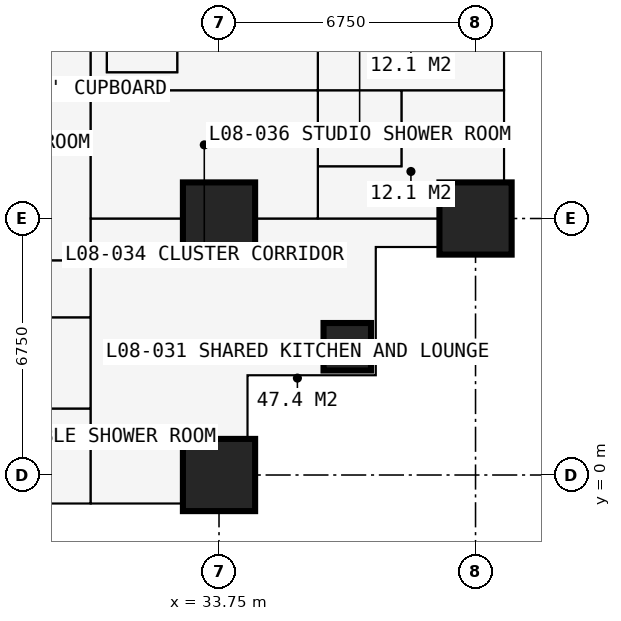
"""IFC4 building model, lengths in metres.
Left out: names, types, materials, properties, quantities, classifications, styles, units other than length and angle.
Written with IfcOpenShell. Run it as: python <this file> out.ifc"""

import sys

from ifc_helpers import new_model, si_unit, direction, frame, frame_2d, origin, origin_2d, place, context, subcontext, project, spatial, rectangle, extrude, element, fill, save


model = new_model("IFC4")
c1 = context("Model", 3, precision=1e-05, world=origin(), true_north=direction((0.0, 1.0)))
c2 = subcontext(c1, "Body", "Model", "MODEL_VIEW")
j1 = project(units=[si_unit("LENGTHUNIT", "METRE"), si_unit("PLANEANGLEUNIT", "RADIAN")], contexts=[c1])
p1 = place(None, origin())
s1 = spatial("IfcSite", under=j1, at=p1, CompositionType="ELEMENT")
p2 = place(p1, origin())
s2 = spatial("IfcBuilding", under=s1, at=p2, CompositionType="ELEMENT")
p3 = place(p2, frame((0.0, 0.0, 32.4)))
s3 = spatial("IfcBuildingStorey", under=s2, at=p3, CompositionType="ELEMENT", Elevation=32.4)
for number, where, z_axis, x_axis in (
    (1, (33.75, 0.0, 0.0), (0.0, 0.0, 1.0), (1.0, 0.0, 0.0)),
    (2, (33.75, 6.75, 0.0), (0.0, 0.0, 1.0), (1.0, 0.0, 0.0)),
):
    element("IfcColumn", number, at=place(p3, frame(where, z_axis=z_axis, x_axis=x_axis)), inside=s3, PredefinedType="COLUMN", context=c2, shape_type="SweptSolid", body=[
        extrude(rectangle(XDim=1.9, YDim=1.9, at=origin_2d()), origin(), (0.0, 0.0, 1.0), 3.6),
    ])
p4 = place(p3, frame((37.125, 3.375, 0.0), z_axis=(0.0, 0.0, 1.0), x_axis=(1.0, 0.0, 0.0)))
e3 = element("IfcColumn", 3, at=p4, inside=s3, PredefinedType="COLUMN", context=c2, shape_type="SweptSolid", body=[
    extrude(rectangle(XDim=1.25, YDim=1.25, at=origin_2d()), origin(), (0.0, 0.0, 1.0), 3.6),
])
p5 = place(p3, frame((40.5, 6.75, 0.0), z_axis=(0.0, 0.0, 1.0), x_axis=(1.0, 0.0, 0.0)))
e4 = element("IfcColumn", 4, at=p5, inside=s3, PredefinedType="COLUMN", context=c2, shape_type="SweptSolid", body=[
    extrude(rectangle(XDim=1.9, YDim=1.9, at=origin_2d()), origin(), (0.0, 0.0, 1.0), 3.6),
])
p6 = place(p3, frame((34.5, -0.75, 0.0), z_axis=(0.0, 0.0, 1.0), x_axis=(0.0, 1.0, 0.0)))
e5 = element("IfcWall", 5, at=p6, inside=s3, PredefinedType="SOLIDWALL", context=c2, shape_type="SweptSolid", body=[
    extrude(rectangle(XDim=3.375, YDim=0.3, at=frame_2d((1.688, 0.0))), origin(), (0.0, 0.0, 1.0), 3.375),
])
p7 = place(p6, frame((1.857, 0.0, 0.9)))
e6 = element("IfcOpeningElement", 6, at=p7, cuts=e5, PredefinedType="OPENING", context=c2, shape_type="SweptSolid", body=[
    extrude(rectangle(XDim=1.2, YDim=1.8, at=frame_2d((0.6, 0.9))), frame((0.0, 0.16, 0.0), z_axis=(0.0, -1.0, 0.0), x_axis=(1.0, 0.0, 0.0)), (0.0, 0.0, 1.0), 0.32),
])
p8 = place(p3, frame((34.5, 2.625, 0.0), z_axis=(0.0, 0.0, 1.0), x_axis=(1.0, 0.0, 0.0)))
e7 = element("IfcWall", 7, at=p8, inside=s3, PredefinedType="SOLIDWALL", context=c2, shape_type="SweptSolid", body=[
    extrude(rectangle(XDim=3.375, YDim=0.3, at=frame_2d((1.688, 0.0))), origin(), (0.0, 0.0, 1.0), 3.375),
])
p9 = place(p8, frame((0.788, 0.0, 0.6)))
e8 = element("IfcOpeningElement", 8, at=p9, cuts=e7, PredefinedType="OPENING", context=c2, shape_type="SweptSolid", body=[
    extrude(rectangle(XDim=1.8, YDim=2.1, at=frame_2d((0.9, 1.05))), frame((0.0, 0.16, 0.0), z_axis=(0.0, -1.0, 0.0), x_axis=(1.0, 0.0, 0.0)), (0.0, 0.0, 1.0), 0.32),
])
p10 = place(p3, frame((37.875, 2.625, 0.0), z_axis=(0.0, 0.0, 1.0), x_axis=(0.0, 1.0, 0.0)))
e9 = element("IfcWall", 9, at=p10, inside=s3, PredefinedType="SOLIDWALL", context=c2, shape_type="SweptSolid", body=[
    extrude(rectangle(XDim=3.375, YDim=0.3, at=frame_2d((1.688, 0.0))), origin(), (0.0, 0.0, 1.0), 3.375),
])
p11 = place(p10, frame((0.788, 0.0, 0.6)))
e10 = element("IfcOpeningElement", 10, at=p11, cuts=e9, PredefinedType="OPENING", context=c2, shape_type="SweptSolid", body=[
    extrude(rectangle(XDim=1.8, YDim=2.1, at=frame_2d((0.9, 1.05))), frame((0.0, 0.16, 0.0), z_axis=(0.0, -1.0, 0.0), x_axis=(1.0, 0.0, 0.0)), (0.0, 0.0, 1.0), 0.32),
])
p12 = place(p3, frame((37.875, 6.0, 0.0), z_axis=(0.0, 0.0, 1.0), x_axis=(1.0, 0.0, 0.0)))
e11 = element("IfcWall", 11, at=p12, inside=s3, PredefinedType="SOLIDWALL", context=c2, shape_type="SweptSolid", body=[
    extrude(rectangle(XDim=3.375, YDim=0.3, at=frame_2d((1.688, 0.0))), origin(), (0.0, 0.0, 1.0), 3.375),
])
p13 = place(p12, frame((0.317, 0.0, 0.9)))
e12 = element("IfcOpeningElement", 12, at=p13, cuts=e11, PredefinedType="OPENING", context=c2, shape_type="SweptSolid", body=[
    extrude(rectangle(XDim=1.2, YDim=1.8, at=frame_2d((0.6, 0.9))), frame((0.0, 0.16, 0.0), z_axis=(0.0, -1.0, 0.0), x_axis=(1.0, 0.0, 0.0)), (0.0, 0.0, 1.0), 0.32),
])
p14 = place(p3, frame((6.75, 4.15, 0.0), z_axis=(0.0, 0.0, 1.0), x_axis=(1.0, 0.0, 0.0)))
e13 = element("IfcWall", 13, at=p14, inside=s3, PredefinedType="PARTITIONING", context=c2, shape_type="SweptSolid", body=[
    extrude(rectangle(XDim=23.625, YDim=0.1, at=frame_2d((11.812, 0.0))), origin(), (0.0, 0.0, 1.0), 3.375),
])
p15 = place(p14, frame((2.85, 0.0, 0.0)))
e14 = element("IfcOpeningElement", 14, at=p15, cuts=e13, PredefinedType="OPENING", context=c2, shape_type="SweptSolid", body=[
    extrude(rectangle(XDim=1.0, YDim=2.2, at=frame_2d((0.5, 1.1))), frame((0.0, 0.06, 0.0), z_axis=(0.0, -1.0, 0.0), x_axis=(1.0, 0.0, 0.0)), (0.0, 0.0, 1.0), 0.12),
])
p16 = place(p14, frame((6.95, 0.0, 0.0)))
e15 = element("IfcOpeningElement", 15, at=p16, cuts=e13, PredefinedType="OPENING", context=c2, shape_type="SweptSolid", body=[
    extrude(rectangle(XDim=0.95, YDim=2.2, at=frame_2d((0.475, 1.1))), frame((0.0, 0.06, 0.0), z_axis=(0.0, -1.0, 0.0), x_axis=(1.0, 0.0, 0.0)), (0.0, 0.0, 1.0), 0.12),
])
p17 = place(p14, frame((10.375, 0.0, 0.0)))
e16 = element("IfcOpeningElement", 16, at=p17, cuts=e13, PredefinedType="OPENING", context=c2, shape_type="SweptSolid", body=[
    extrude(rectangle(XDim=0.95, YDim=2.2, at=frame_2d((0.475, 1.1))), frame((0.0, 0.06, 0.0), z_axis=(0.0, -1.0, 0.0), x_axis=(1.0, 0.0, 0.0)), (0.0, 0.0, 1.0), 0.12),
])
p18 = place(p14, frame((18.475, 0.0, 0.0)))
e17 = element("IfcOpeningElement", 17, at=p18, cuts=e13, PredefinedType="OPENING", context=c2, shape_type="SweptSolid", body=[
    extrude(rectangle(XDim=0.95, YDim=2.2, at=frame_2d((0.475, 1.1))), frame((0.0, 0.06, 0.0), z_axis=(0.0, -1.0, 0.0), x_axis=(1.0, 0.0, 0.0)), (0.0, 0.0, 1.0), 0.12),
])
p19 = place(p14, frame((13.7, 0.0, 0.0)))
e18 = element("IfcOpeningElement", 18, at=p19, cuts=e13, PredefinedType="OPENING", context=c2, shape_type="SweptSolid", body=[
    extrude(rectangle(XDim=0.95, YDim=2.2, at=frame_2d((0.475, 1.1))), frame((0.0, 0.06, 0.0), z_axis=(0.0, -1.0, 0.0), x_axis=(1.0, 0.0, 0.0)), (0.0, 0.0, 1.0), 0.12),
])
p20 = place(p3, frame((22.988, 5.65, 0.0), z_axis=(0.0, 0.0, 1.0), x_axis=(1.0, 0.0, 0.0)))
e19 = element("IfcWall", 19, at=p20, inside=s3, PredefinedType="PARTITIONING", context=c2, shape_type="SweptSolid", body=[
    extrude(rectangle(XDim=7.387, YDim=0.15, at=frame_2d((3.694, 0.0))), origin(), (0.0, 0.0, 1.0), 3.375),
])
p21 = place(p20, frame((2.1, 0.0, 0.0)))
e20 = element("IfcOpeningElement", 20, at=p21, cuts=e19, PredefinedType="OPENING", context=c2, shape_type="SweptSolid", body=[
    extrude(rectangle(XDim=0.95, YDim=2.2, at=frame_2d((0.475, 1.1))), frame((0.0, 0.085, 0.0), z_axis=(0.0, -1.0, 0.0), x_axis=(1.0, 0.0, 0.0)), (0.0, 0.0, 1.0), 0.17),
])
p22 = place(p3, frame((27.775, 1.75, 0.0), z_axis=(0.0, 0.0, 1.0), x_axis=(1.0, 0.0, 0.0)))
e21 = element("IfcWall", 21, at=p22, inside=s3, PredefinedType="PARTITIONING", context=c2, shape_type="SweptSolid", body=[
    extrude(rectangle(XDim=2.6, YDim=0.1, at=frame_2d((1.3, 0.0))), origin(), (0.0, 0.0, 1.0), 3.375),
])
p23 = place(p22, frame((0.85, 0.0, 0.0)))
e22 = element("IfcOpeningElement", 22, at=p23, cuts=e21, PredefinedType="OPENING", context=c2, shape_type="SweptSolid", body=[
    extrude(rectangle(XDim=0.9, YDim=2.2, at=frame_2d((0.45, 1.1))), frame((0.0, 0.06, 0.0), z_axis=(0.0, -1.0, 0.0), x_axis=(1.0, 0.0, 0.0)), (0.0, 0.0, 1.0), 0.12),
])
p24 = place(p3, frame((30.375, -0.734, 0.0), z_axis=(0.0, 0.0, 1.0), x_axis=(0.0, 1.0, 0.0)))
e23 = element("IfcWall", 23, at=p24, inside=s3, PredefinedType="PARTITIONING", context=c2, shape_type="SweptSolid", body=[
    extrude(rectangle(XDim=12.034, YDim=0.15, at=frame_2d((6.017, 0.0))), origin(), (0.0, 0.0, 1.0), 3.375),
])
p25 = place(p3, frame((30.375, 6.75, 0.0), z_axis=(0.0, 0.0, 1.0), x_axis=(1.0, 0.0, 0.0)))
e24 = element("IfcWall", 24, at=p25, inside=s3, PredefinedType="PARTITIONING", context=c2, shape_type="SweptSolid", body=[
    extrude(rectangle(XDim=10.859, YDim=0.15, at=frame_2d((5.429, 0.0))), origin(), (0.0, 0.0, 1.0), 2.877),
])
p26 = place(p25, frame((1.4, 0.0, 0.0)))
e25 = element("IfcOpeningElement", 25, at=p26, cuts=e24, PredefinedType="OPENING", context=c2, shape_type="SweptSolid", body=[
    extrude(rectangle(XDim=1.0, YDim=2.2, at=frame_2d((0.5, 1.1))), frame((0.0, 0.085, 0.0), z_axis=(0.0, -1.0, 0.0), x_axis=(1.0, 0.0, 0.0)), (0.0, 0.0, 1.0), 0.17),
])
p27 = place(p3, frame((30.375, 10.125, 0.0), z_axis=(0.0, 0.0, 1.0), x_axis=(1.0, 0.0, 0.0)))
e26 = element("IfcWall", 26, at=p27, inside=s3, PredefinedType="PARTITIONING", context=c2, shape_type="SweptSolid", body=[
    extrude(rectangle(XDim=10.859, YDim=0.15, at=frame_2d((5.429, 0.0))), origin(), (0.0, 0.0, 1.0), 3.375),
])
p28 = place(p27, frame((2.5, 0.0, 0.0)))
e27 = element("IfcOpeningElement", 27, at=p28, cuts=e26, PredefinedType="OPENING", context=c2, shape_type="SweptSolid", body=[
    extrude(rectangle(XDim=1.0, YDim=2.2, at=frame_2d((0.5, 1.1))), frame((0.0, 0.085, 0.0), z_axis=(0.0, -1.0, 0.0), x_axis=(1.0, 0.0, 0.0)), (0.0, 0.0, 1.0), 0.17),
])
p29 = place(p3, frame((30.8, 10.6, 0.0), z_axis=(0.0, 0.0, 1.0), x_axis=(0.0, 1.0, 0.0)))
e28 = element("IfcWall", 28, at=p29, inside=s3, PredefinedType="PARTITIONING", context=c2, shape_type="SweptSolid", body=[
    extrude(rectangle(XDim=0.7, YDim=0.15, at=frame_2d((0.35, 0.0))), origin(), (0.0, 0.0, 1.0), 3.375),
])
p30 = place(p3, frame((30.8, 10.6, 0.0), z_axis=(0.0, 0.0, 1.0), x_axis=(1.0, 0.0, 0.0)))
e29 = element("IfcWall", 29, at=p30, inside=s3, PredefinedType="PARTITIONING", context=c2, shape_type="SweptSolid", body=[
    extrude(rectangle(XDim=1.85, YDim=0.15, at=frame_2d((0.925, 0.0))), origin(), (0.0, 0.0, 1.0), 3.375),
])
p31 = place(p3, frame((32.65, 10.6, 0.0), z_axis=(0.0, 0.0, 1.0), x_axis=(0.0, 1.0, 0.0)))
e30 = element("IfcWall", 30, at=p31, inside=s3, PredefinedType="SHEAR", context=c2, shape_type="SweptSolid", body=[
    extrude(rectangle(XDim=9.3, YDim=0.1, at=frame_2d((4.65, 0.0))), origin(), (0.0, 0.0, 1.0), 3.375),
])
p32 = place(p31, frame((0.5, 0.0, 0.0)))
e31 = element("IfcOpeningElement", 31, at=p32, cuts=e30, PredefinedType="OPENING", context=c2, shape_type="SweptSolid", body=[
    extrude(rectangle(XDim=1.0, YDim=2.2, at=frame_2d((0.5, 1.1))), frame((0.0, 0.06, 0.0), z_axis=(0.0, -1.0, 0.0), x_axis=(1.0, 0.0, 0.0)), (0.0, 0.0, 1.0), 0.12),
])
p33 = place(p3, frame((36.35, 6.75, 0.0), z_axis=(0.0, 0.0, 1.0), x_axis=(0.0, 1.0, 0.0)))
e32 = element("IfcWall", 32, at=p33, inside=s3, PredefinedType="PARTITIONING", context=c2, shape_type="SweptSolid", body=[
    extrude(rectangle(XDim=23.625, YDim=0.1, at=frame_2d((11.812, 0.0))), origin(), (0.0, 0.0, 1.0), 3.375),
])
p34 = place(p33, frame((0.2, 0.0, 0.0)))
e33 = element("IfcOpeningElement", 33, at=p34, cuts=e32, PredefinedType="OPENING", context=c2, shape_type="SweptSolid", body=[
    extrude(rectangle(XDim=0.95, YDim=2.2, at=frame_2d((0.475, 1.1))), frame((0.0, 0.06, 0.0), z_axis=(0.0, -1.0, 0.0), x_axis=(1.0, 0.0, 0.0)), (0.0, 0.0, 1.0), 0.12),
])
p35 = place(p33, frame((3.575, 0.0, 0.0)))
e34 = element("IfcOpeningElement", 34, at=p35, cuts=e32, PredefinedType="OPENING", context=c2, shape_type="SweptSolid", body=[
    extrude(rectangle(XDim=0.95, YDim=2.2, at=frame_2d((0.475, 1.1))), frame((0.0, 0.06, 0.0), z_axis=(0.0, -1.0, 0.0), x_axis=(1.0, 0.0, 0.0)), (0.0, 0.0, 1.0), 0.12),
])
p36 = place(p33, frame((7.0, 0.0, 0.0)))
e35 = element("IfcOpeningElement", 35, at=p36, cuts=e32, PredefinedType="OPENING", context=c2, shape_type="SweptSolid", body=[
    extrude(rectangle(XDim=0.95, YDim=2.2, at=frame_2d((0.475, 1.1))), frame((0.0, 0.06, 0.0), z_axis=(0.0, -1.0, 0.0), x_axis=(1.0, 0.0, 0.0)), (0.0, 0.0, 1.0), 0.12),
])
p37 = place(p33, frame((10.375, 0.0, 0.0)))
e36 = element("IfcOpeningElement", 36, at=p37, cuts=e32, PredefinedType="OPENING", context=c2, shape_type="SweptSolid", body=[
    extrude(rectangle(XDim=0.95, YDim=2.2, at=frame_2d((0.475, 1.1))), frame((0.0, 0.06, 0.0), z_axis=(0.0, -1.0, 0.0), x_axis=(1.0, 0.0, 0.0)), (0.0, 0.0, 1.0), 0.12),
])
p38 = place(p33, frame((13.75, 0.0, 0.0)))
e37 = element("IfcOpeningElement", 37, at=p38, cuts=e32, PredefinedType="OPENING", context=c2, shape_type="SweptSolid", body=[
    extrude(rectangle(XDim=0.95, YDim=2.2, at=frame_2d((0.475, 1.1))), frame((0.0, 0.06, 0.0), z_axis=(0.0, -1.0, 0.0), x_axis=(1.0, 0.0, 0.0)), (0.0, 0.0, 1.0), 0.12),
])
p39 = place(p33, frame((17.125, 0.0, 0.0)))
e38 = element("IfcOpeningElement", 38, at=p39, cuts=e32, PredefinedType="OPENING", context=c2, shape_type="SweptSolid", body=[
    extrude(rectangle(XDim=0.95, YDim=2.2, at=frame_2d((0.475, 1.1))), frame((0.0, 0.06, 0.0), z_axis=(0.0, -1.0, 0.0), x_axis=(1.0, 0.0, 0.0)), (0.0, 0.0, 1.0), 0.12),
])
p40 = place(p33, frame((20.5, 0.0, 0.0)))
e39 = element("IfcOpeningElement", 39, at=p40, cuts=e32, PredefinedType="OPENING", context=c2, shape_type="SweptSolid", body=[
    extrude(rectangle(XDim=0.95, YDim=2.2, at=frame_2d((0.475, 1.1))), frame((0.0, 0.06, 0.0), z_axis=(0.0, -1.0, 0.0), x_axis=(1.0, 0.0, 0.0)), (0.0, 0.0, 1.0), 0.12),
])
p41 = place(p3, frame((36.35, 8.125, 0.0), z_axis=(0.0, 0.0, 1.0), x_axis=(1.0, 0.0, 0.0)))
e40 = element("IfcWall", 40, at=p41, inside=s3, PredefinedType="PARTITIONING", context=c2, shape_type="SweptSolid", body=[
    extrude(rectangle(XDim=2.2, YDim=0.1, at=frame_2d((1.1, 0.0))), origin(), (0.0, 0.0, 1.0), 3.375),
])
p42 = place(p41, frame((0.65, 0.0, 0.0)))
e41 = element("IfcOpeningElement", 41, at=p42, cuts=e40, PredefinedType="OPENING", context=c2, shape_type="SweptSolid", body=[
    extrude(rectangle(XDim=0.9, YDim=2.2, at=frame_2d((0.45, 1.1))), frame((0.0, 0.06, 0.0), z_axis=(0.0, -1.0, 0.0), x_axis=(1.0, 0.0, 0.0)), (0.0, 0.0, 1.0), 0.12),
])
p43 = place(p3, frame((38.55, 8.125, 0.0), z_axis=(0.0, 0.0, 1.0), x_axis=(0.0, 1.0, 0.0)))
e42 = element("IfcWall", 42, at=p43, inside=s3, PredefinedType="PARTITIONING", context=c2, shape_type="SweptSolid", body=[
    extrude(rectangle(XDim=2.0, YDim=0.1, at=frame_2d((1.0, 0.0))), origin(), (0.0, 0.0, 1.0), 3.375),
])
p44 = place(p7, origin())
e43 = element("IfcWindow", 43, at=p44, inside=s3, PartitioningType="SINGLE_PANEL", PredefinedType="WINDOW", context=c2, shape_type="SweptSolid", body=[
    extrude(rectangle(XDim=1.2, YDim=1.8, at=frame_2d((0.6, 0.9))), frame((0.0, 0.03, 0.0), z_axis=(0.0, -1.0, 0.0), x_axis=(1.0, 0.0, 0.0)), (0.0, 0.0, 1.0), 0.06),
])
fill(e6, e43)
p45 = place(p9, origin())
e44 = element("IfcWindow", 44, at=p45, inside=s3, PartitioningType="SINGLE_PANEL", PredefinedType="WINDOW", context=c2, shape_type="SweptSolid", body=[
    extrude(rectangle(XDim=1.8, YDim=2.1, at=frame_2d((0.9, 1.05))), frame((0.0, 0.03, 0.0), z_axis=(0.0, -1.0, 0.0), x_axis=(1.0, 0.0, 0.0)), (0.0, 0.0, 1.0), 0.06),
])
fill(e8, e44)
p46 = place(p11, origin())
e45 = element("IfcWindow", 45, at=p46, inside=s3, PartitioningType="SINGLE_PANEL", PredefinedType="WINDOW", context=c2, shape_type="SweptSolid", body=[
    extrude(rectangle(XDim=1.8, YDim=2.1, at=frame_2d((0.9, 1.05))), frame((0.0, 0.03, 0.0), z_axis=(0.0, -1.0, 0.0), x_axis=(1.0, 0.0, 0.0)), (0.0, 0.0, 1.0), 0.06),
])
fill(e10, e45)
p47 = place(p13, origin())
e46 = element("IfcWindow", 46, at=p47, inside=s3, PartitioningType="SINGLE_PANEL", PredefinedType="WINDOW", context=c2, shape_type="SweptSolid", body=[
    extrude(rectangle(XDim=1.2, YDim=1.8, at=frame_2d((0.6, 0.9))), frame((0.0, 0.03, 0.0), z_axis=(0.0, -1.0, 0.0), x_axis=(1.0, 0.0, 0.0)), (0.0, 0.0, 1.0), 0.06),
])
fill(e12, e46)
p48 = place(p23, origin())
e47 = element("IfcDoor", 47, at=p48, inside=s3, OperationType="SINGLE_SWING_RIGHT", PredefinedType="DOOR", context=c2, shape_type="SweptSolid", body=[
    extrude(rectangle(XDim=0.9, YDim=2.2, at=frame_2d((0.45, 1.1))), frame((0.0, 0.025, 0.0), z_axis=(0.0, -1.0, 0.0), x_axis=(1.0, 0.0, 0.0)), (0.0, 0.0, 1.0), 0.05),
])
fill(e22, e47)
p49 = place(p26, origin())
e48 = element("IfcDoor", 48, at=p49, inside=s3, OperationType="SINGLE_SWING_LEFT", PredefinedType="DOOR", context=c2, shape_type="SweptSolid", body=[
    extrude(rectangle(XDim=1.0, YDim=2.2, at=frame_2d((0.5, 1.1))), frame((0.0, 0.025, 0.0), z_axis=(0.0, -1.0, 0.0), x_axis=(1.0, 0.0, 0.0)), (0.0, 0.0, 1.0), 0.05),
])
fill(e25, e48)
p50 = place(p34, origin())
e49 = element("IfcDoor", 49, at=p50, inside=s3, OperationType="SINGLE_SWING_LEFT", PredefinedType="DOOR", context=c2, shape_type="SweptSolid", body=[
    extrude(rectangle(XDim=0.95, YDim=2.2, at=frame_2d((0.475, 1.1))), frame((0.0, 0.025, 0.0), z_axis=(0.0, -1.0, 0.0), x_axis=(1.0, 0.0, 0.0)), (0.0, 0.0, 1.0), 0.05),
])
fill(e33, e49)
p51 = place(p42, origin())
e50 = element("IfcDoor", 50, at=p51, inside=s3, OperationType="SINGLE_SWING_RIGHT", PredefinedType="DOOR", context=c2, shape_type="SweptSolid", body=[
    extrude(rectangle(XDim=0.9, YDim=2.2, at=frame_2d((0.45, 1.1))), frame((0.0, 0.025, 0.0), z_axis=(0.0, -1.0, 0.0), x_axis=(1.0, 0.0, 0.0)), (0.0, 0.0, 1.0), 0.05),
])
fill(e41, e50)
p52 = place(p28, origin())
e51 = element("IfcDoor", 51, at=p52, inside=s3, OperationType="SINGLE_SWING_LEFT", PredefinedType="DOOR", context=c2, shape_type="SweptSolid", body=[
    extrude(rectangle(XDim=1.0, YDim=2.2, at=frame_2d((0.5, 1.1))), frame((0.0, 0.025, 0.0), z_axis=(0.0, -1.0, 0.0), x_axis=(1.0, 0.0, 0.0)), (0.0, 0.0, 1.0), 0.05),
])
fill(e27, e51)
p53 = place(p35, origin())
e52 = element("IfcDoor", 52, at=p53, inside=s3, OperationType="SINGLE_SWING_LEFT", PredefinedType="DOOR", context=c2, shape_type="SweptSolid", body=[
    extrude(rectangle(XDim=0.95, YDim=2.2, at=frame_2d((0.475, 1.1))), frame((0.0, 0.025, 0.0), z_axis=(0.0, -1.0, 0.0), x_axis=(1.0, 0.0, 0.0)), (0.0, 0.0, 1.0), 0.05),
])
fill(e34, e52)
p54 = place(p32, origin())
e53 = element("IfcDoor", 53, at=p54, inside=s3, OperationType="SINGLE_SWING_LEFT", PredefinedType="DOOR", context=c2, shape_type="SweptSolid", body=[
    extrude(rectangle(XDim=1.0, YDim=2.2, at=frame_2d((0.5, 1.1))), frame((0.0, 0.025, 0.0), z_axis=(0.0, -1.0, 0.0), x_axis=(1.0, 0.0, 0.0)), (0.0, 0.0, 1.0), 0.05),
])
fill(e31, e53)
save(model, sys.argv[1])
